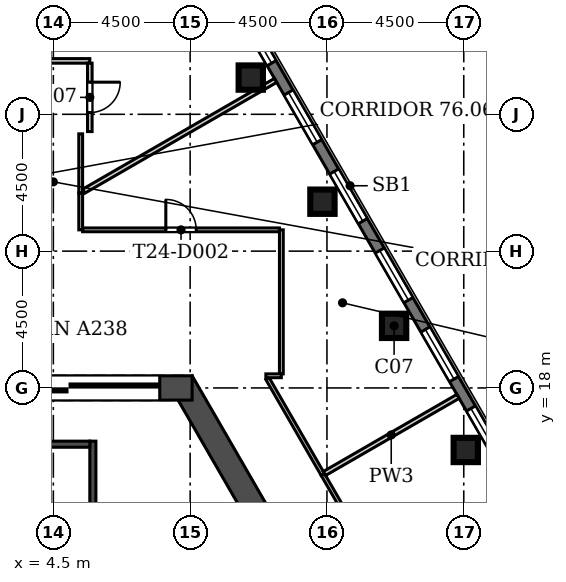
"""IFC4 building model, lengths in metres.
Left out: names, types, materials, properties, quantities, classifications, styles, units other than length and angle.
Written with IfcOpenShell. Run it as: python <this file> out.ifc"""

import sys

from ifc_helpers import new_model, si_unit, direction, frame, frame_2d, origin, origin_2d, place, context, subcontext, project, spatial, rectangle, extrude, element, fill, save


model = new_model("IFC4")
c1 = context("Model", 3, precision=1e-05, world=origin(), true_north=direction((0.0, 1.0)))
c2 = subcontext(c1, "Body", "Model", "MODEL_VIEW")
j1 = project(units=[si_unit("LENGTHUNIT", "METRE"), si_unit("PLANEANGLEUNIT", "RADIAN")], contexts=[c1])
p1 = place(None, origin())
s1 = spatial("IfcSite", under=j1, at=p1, CompositionType="ELEMENT")
p2 = place(p1, origin())
s2 = spatial("IfcBuilding", under=s1, at=p2, CompositionType="ELEMENT")
p3 = place(p2, frame((0.0, 0.0, 335.1)))
s3 = spatial("IfcBuildingStorey", under=s2, at=p3, CompositionType="ELEMENT", Elevation=335.1)
for number, where, z_axis, x_axis in (
    (1, (18.066, 15.96, 0.0), (0.0, 0.0, 1.0), (1.0, 0.0, 0.0)),
    (2, (15.709, 20.042, 0.0), (0.0, 0.0, 1.0), (1.0, 0.0, 0.0)),
    (3, (13.352, 24.125, 0.0), (0.0, 0.0, 1.0), (1.0, 0.0, 0.0)),
    (4, (10.994, 28.208, 0.0), (0.0, 0.0, 1.0), (1.0, 0.0, 0.0)),
):
    element("IfcColumn", number, at=place(p3, frame(where, z_axis=z_axis, x_axis=x_axis)), inside=s3, PredefinedType="COLUMN", context=c2, shape_type="SweptSolid", body=[
        extrude(rectangle(XDim=0.8, YDim=0.8, at=origin_2d()), origin(), (0.0, 0.0, 1.0), 4.2),
    ])
p4 = place(p3, frame((13.054, 10.692, 0.0), z_axis=(0.0, 0.0, 1.0), x_axis=(-0.500015780397, 0.866016292776, 0.0)))
e5 = element("IfcWall", 5, at=p4, inside=s3, PredefinedType="SHEAR", context=c2, shape_type="SweptSolid", body=[
    extrude(rectangle(XDim=8.67, YDim=0.8, at=frame_2d((4.335, 0.0))), origin(), (0.0, 0.0, 1.0), 4.2),
])
p5 = place(p3, frame((9.065, 18.0, 0.0), z_axis=(0.0, 0.0, 1.0), x_axis=(-1.0, 0.0, 0.0)))
e6 = element("IfcWall", 6, at=p5, inside=s3, PredefinedType="SHEAR", context=c2, shape_type="SweptSolid", body=[
    extrude(rectangle(XDim=18.13, YDim=0.8, at=frame_2d((9.065, 0.0))), origin(), (0.0, 0.0, 1.0), 4.2),
])
p6 = place(p5, frame((8.365, 0.0, 0.0)))
e7 = element("IfcOpeningElement", 7, at=p6, cuts=e6, PredefinedType="OPENING", context=c2, shape_type="SweptSolid", body=[
    extrude(rectangle(XDim=1.4, YDim=2.1, at=frame_2d((0.7, 1.05))), frame((0.0, 0.41, 0.0), z_axis=(0.0, -1.0, 0.0), x_axis=(1.0, 0.0, 0.0)), (0.0, 0.0, 1.0), 0.82),
])
p7 = place(p5, frame((11.065, 0.0, 0.0)))
e8 = element("IfcOpeningElement", 8, at=p7, cuts=e6, PredefinedType="OPENING", context=c2, shape_type="SweptSolid", body=[
    extrude(rectangle(XDim=6.0, YDim=2.4, at=frame_2d((3.0, 1.2))), frame((0.0, 0.41, 0.0), z_axis=(0.0, -1.0, 0.0), x_axis=(1.0, 0.0, 0.0)), (0.0, 0.0, 1.0), 0.82),
])
p8 = place(p5, frame((1.065, 0.0, 0.0)))
e9 = element("IfcOpeningElement", 9, at=p8, cuts=e6, PredefinedType="OPENING", context=c2, shape_type="SweptSolid", body=[
    extrude(rectangle(XDim=6.0, YDim=2.4, at=frame_2d((3.0, 1.2))), frame((0.0, 0.41, 0.0), z_axis=(0.0, -1.0, 0.0), x_axis=(1.0, 0.0, 0.0)), (0.0, 0.0, 1.0), 0.82),
])
p9 = place(p3, frame((23.788, 7.709, 0.0), z_axis=(0.0, 0.0, 1.0), x_axis=(-0.500001731347, 0.866024404189, 0.0)))
e10 = element("IfcWall", 10, at=p9, inside=s3, PredefinedType="SOLIDWALL", context=c2, shape_type="SweptSolid", body=[
    extrude(rectangle(XDim=38.87, YDim=0.34, at=frame_2d((19.435, 0.0))), origin(), (0.0, 0.0, 1.0), 3.8),
])
p10 = place(p9, frame((3.218, 0.0, 0.9)))
e11 = element("IfcOpeningElement", 11, at=p10, cuts=e10, PredefinedType="OPENING", context=c2, shape_type="SweptSolid", body=[
    extrude(rectangle(XDim=1.885, YDim=2.6, at=frame_2d((0.942, 1.3))), frame((0.0, 0.18, 0.0), z_axis=(0.0, -1.0, 0.0), x_axis=(1.0, 0.0, 0.0)), (0.0, 0.0, 1.0), 0.36),
])
p11 = place(p9, frame((6.218, 0.0, 0.9)))
e12 = element("IfcOpeningElement", 12, at=p11, cuts=e10, PredefinedType="OPENING", context=c2, shape_type="SweptSolid", body=[
    extrude(rectangle(XDim=1.885, YDim=2.6, at=frame_2d((0.942, 1.3))), frame((0.0, 0.18, 0.0), z_axis=(0.0, -1.0, 0.0), x_axis=(1.0, 0.0, 0.0)), (0.0, 0.0, 1.0), 0.36),
])
p12 = place(p9, frame((9.218, 0.0, 0.9)))
e13 = element("IfcOpeningElement", 13, at=p12, cuts=e10, PredefinedType="OPENING", context=c2, shape_type="SweptSolid", body=[
    extrude(rectangle(XDim=1.885, YDim=2.6, at=frame_2d((0.942, 1.3))), frame((0.0, 0.18, 0.0), z_axis=(0.0, -1.0, 0.0), x_axis=(1.0, 0.0, 0.0)), (0.0, 0.0, 1.0), 0.36),
])
p13 = place(p9, frame((12.218, 0.0, 0.9)))
e14 = element("IfcOpeningElement", 14, at=p13, cuts=e10, PredefinedType="OPENING", context=c2, shape_type="SweptSolid", body=[
    extrude(rectangle(XDim=1.885, YDim=2.6, at=frame_2d((0.942, 1.3))), frame((0.0, 0.18, 0.0), z_axis=(0.0, -1.0, 0.0), x_axis=(1.0, 0.0, 0.0)), (0.0, 0.0, 1.0), 0.36),
])
p14 = place(p9, frame((15.218, 0.0, 0.9)))
e15 = element("IfcOpeningElement", 15, at=p14, cuts=e10, PredefinedType="OPENING", context=c2, shape_type="SweptSolid", body=[
    extrude(rectangle(XDim=1.885, YDim=2.6, at=frame_2d((0.942, 1.3))), frame((0.0, 0.18, 0.0), z_axis=(0.0, -1.0, 0.0), x_axis=(1.0, 0.0, 0.0)), (0.0, 0.0, 1.0), 0.36),
])
p15 = place(p9, frame((18.218, 0.0, 0.9)))
e16 = element("IfcOpeningElement", 16, at=p15, cuts=e10, PredefinedType="OPENING", context=c2, shape_type="SweptSolid", body=[
    extrude(rectangle(XDim=1.885, YDim=2.6, at=frame_2d((0.942, 1.3))), frame((0.0, 0.18, 0.0), z_axis=(0.0, -1.0, 0.0), x_axis=(1.0, 0.0, 0.0)), (0.0, 0.0, 1.0), 0.36),
])
p16 = place(p9, frame((21.218, 0.0, 0.9)))
e17 = element("IfcOpeningElement", 17, at=p16, cuts=e10, PredefinedType="OPENING", context=c2, shape_type="SweptSolid", body=[
    extrude(rectangle(XDim=1.885, YDim=2.6, at=frame_2d((0.942, 1.3))), frame((0.0, 0.18, 0.0), z_axis=(0.0, -1.0, 0.0), x_axis=(1.0, 0.0, 0.0)), (0.0, 0.0, 1.0), 0.36),
])
p17 = place(p9, frame((24.218, 0.0, 0.9)))
e18 = element("IfcOpeningElement", 18, at=p17, cuts=e10, PredefinedType="OPENING", context=c2, shape_type="SweptSolid", body=[
    extrude(rectangle(XDim=1.885, YDim=2.6, at=frame_2d((0.942, 1.3))), frame((0.0, 0.18, 0.0), z_axis=(0.0, -1.0, 0.0), x_axis=(1.0, 0.0, 0.0)), (0.0, 0.0, 1.0), 0.36),
])
p18 = place(p9, frame((27.218, 0.0, 0.9)))
e19 = element("IfcOpeningElement", 19, at=p18, cuts=e10, PredefinedType="OPENING", context=c2, shape_type="SweptSolid", body=[
    extrude(rectangle(XDim=1.885, YDim=2.6, at=frame_2d((0.942, 1.3))), frame((0.0, 0.18, 0.0), z_axis=(0.0, -1.0, 0.0), x_axis=(1.0, 0.0, 0.0)), (0.0, 0.0, 1.0), 0.36),
])
p19 = place(p9, frame((30.218, 0.0, 0.9)))
e20 = element("IfcOpeningElement", 20, at=p19, cuts=e10, PredefinedType="OPENING", context=c2, shape_type="SweptSolid", body=[
    extrude(rectangle(XDim=1.885, YDim=2.6, at=frame_2d((0.942, 1.3))), frame((0.0, 0.18, 0.0), z_axis=(0.0, -1.0, 0.0), x_axis=(1.0, 0.0, 0.0)), (0.0, 0.0, 1.0), 0.36),
])
p20 = place(p9, frame((33.218, 0.0, 0.9)))
e21 = element("IfcOpeningElement", 21, at=p20, cuts=e10, PredefinedType="OPENING", context=c2, shape_type="SweptSolid", body=[
    extrude(rectangle(XDim=1.885, YDim=2.6, at=frame_2d((0.942, 1.3))), frame((0.0, 0.18, 0.0), z_axis=(0.0, -1.0, 0.0), x_axis=(1.0, 0.0, 0.0)), (0.0, 0.0, 1.0), 0.36),
])
p21 = place(p9, frame((1.051, 0.0, 0.9)))
e22 = element("IfcOpeningElement", 22, at=p21, cuts=e10, PredefinedType="OPENING", context=c2, shape_type="SweptSolid", body=[
    extrude(rectangle(XDim=1.115, YDim=2.4, at=frame_2d((0.558, 1.2))), frame((0.0, 0.18, 0.0), z_axis=(0.0, -1.0, 0.0), x_axis=(1.0, 0.0, 0.0)), (0.0, 0.0, 1.0), 0.36),
])
p22 = place(p9, frame((36.429, 0.0, 0.9)))
e23 = element("IfcOpeningElement", 23, at=p22, cuts=e10, PredefinedType="OPENING", context=c2, shape_type="SweptSolid", body=[
    extrude(rectangle(XDim=1.115, YDim=2.4, at=frame_2d((0.558, 1.2))), frame((0.0, 0.18, 0.0), z_axis=(0.0, -1.0, 0.0), x_axis=(1.0, 0.0, 0.0)), (0.0, 0.0, 1.0), 0.36),
])
p23 = place(p3, frame((5.8, 8.25, -0.4), z_axis=(0.0, 0.0, 1.0), x_axis=(0.0, 1.0, 0.0)))
e24 = element("IfcWall", 24, at=p23, inside=s3, PredefinedType="SOLIDWALL", context=c2, shape_type="SweptSolid", body=[
    extrude(rectangle(XDim=8.0, YDim=0.2, at=frame_2d((4.0, 0.0))), origin(), (0.0, 0.0, 1.0), 4.2),
])
p24 = place(p23, frame((3.5, 0.0, 0.4)))
e25 = element("IfcOpeningElement", 25, at=p24, cuts=e24, PredefinedType="OPENING", context=c2, shape_type="SweptSolid", body=[
    extrude(rectangle(XDim=1.0, YDim=2.1, at=frame_2d((0.5, 1.05))), frame((0.0, 0.11, 0.0), z_axis=(0.0, -1.0, 0.0), x_axis=(1.0, 0.0, 0.0)), (0.0, 0.0, 1.0), 0.22),
])
p25 = place(p3, frame((3.7, 16.15, -0.4), z_axis=(0.0, 0.0, 1.0), x_axis=(1.0, 0.0, 0.0)))
e26 = element("IfcWall", 26, at=p25, inside=s3, PredefinedType="SOLIDWALL", context=c2, shape_type="SweptSolid", body=[
    extrude(rectangle(XDim=2.0, YDim=0.2, at=frame_2d((1.0, 0.0))), origin(), (0.0, 0.0, 1.0), 4.2),
])
p26 = place(p3, frame((11.544, 18.306, 0.0), z_axis=(0.0, 0.0, 1.0), x_axis=(0.500007048974, -0.866021334019, 0.0)))
e27 = element("IfcWall", 27, at=p26, inside=s3, PredefinedType="PARTITIONING", context=c2, shape_type="SweptSolid", body=[
    extrude(rectangle(XDim=3.639, YDim=0.125, at=frame_2d((1.819, 0.0))), origin(), (0.0, 0.0, 1.0), 3.8),
])
p27 = place(p3, frame((13.364, 15.155, 0.0), z_axis=(0.0, 0.0, 1.0), x_axis=(0.499974900732, -0.866039894369, 0.0)))
e28 = element("IfcWall", 28, at=p27, inside=s3, PredefinedType="PARTITIONING", context=c2, shape_type="SweptSolid", body=[
    extrude(rectangle(XDim=4.381, YDim=0.125, at=frame_2d((2.19, 0.0))), origin(), (0.0, 0.0, 1.0), 3.8),
])
p28 = place(p3, frame((5.462, 23.2, 0.0), z_axis=(0.0, 0.0, 1.0), x_axis=(1.0, 0.0, 0.0)))
e29 = element("IfcWall", 29, at=p28, inside=s3, PredefinedType="PARTITIONING", context=c2, shape_type="SweptSolid", body=[
    extrude(rectangle(XDim=6.475, YDim=0.125, at=frame_2d((3.238, 0.0))), origin(), (0.0, 0.0, 1.0), 3.8),
])
p29 = place(p28, frame((2.738, 0.0, 0.0)))
e30 = element("IfcOpeningElement", 30, at=p29, cuts=e29, PredefinedType="OPENING", context=c2, shape_type="SweptSolid", body=[
    extrude(rectangle(XDim=1.0, YDim=2.1, at=frame_2d((0.5, 1.05))), frame((0.0, 0.073, 0.0), z_axis=(0.0, -1.0, 0.0), x_axis=(1.0, 0.0, 0.0)), (0.0, 0.0, 1.0), 0.145),
])
p30 = place(p3, frame((12.0, 23.2, 0.0), z_axis=(0.0, 0.0, 1.0), x_axis=(0.0, -1.0, 0.0)))
e31 = element("IfcWall", 31, at=p30, inside=s3, PredefinedType="PARTITIONING", context=c2, shape_type="SweptSolid", body=[
    extrude(rectangle(XDim=4.738, YDim=0.125, at=frame_2d((2.369, 0.0))), origin(), (0.0, 0.0, 1.0), 3.8),
])
p31 = place(p3, frame((12.0, 18.4, 0.0), z_axis=(0.0, 0.0, 1.0), x_axis=(-1.0, 0.0, 0.0)))
e32 = element("IfcWall", 32, at=p31, inside=s3, PredefinedType="PARTITIONING", context=c2, shape_type="SweptSolid", body=[
    extrude(rectangle(XDim=0.51, YDim=0.125, at=frame_2d((0.255, 0.0))), origin(), (0.0, 0.0, 1.0), 3.8),
])
p32 = place(p3, frame((4.15, 28.757, 0.0), z_axis=(0.0, 0.0, 1.0), x_axis=(1.0, 0.0, 0.0)))
e33 = element("IfcWall", 33, at=p32, inside=s3, PredefinedType="PARTITIONING", context=c2, shape_type="SweptSolid", body=[
    extrude(rectangle(XDim=1.55, YDim=0.15, at=frame_2d((0.775, 0.0))), origin(), (0.0, 0.0, 1.0), 3.8),
])
p33 = place(p3, frame((5.7, 28.682, 0.0), z_axis=(0.0, 0.0, 1.0), x_axis=(0.0, -1.0, 0.0)))
e34 = element("IfcWall", 34, at=p33, inside=s3, PredefinedType="PARTITIONING", context=c2, shape_type="SweptSolid", body=[
    extrude(rectangle(XDim=2.25, YDim=0.15, at=frame_2d((1.125, 0.0))), origin(), (0.0, 0.0, 1.0), 3.8),
])
p34 = place(p33, frame((0.625, 0.0, 0.0)))
e35 = element("IfcOpeningElement", 35, at=p34, cuts=e34, PredefinedType="OPENING", context=c2, shape_type="SweptSolid", body=[
    extrude(rectangle(XDim=1.0, YDim=2.1, at=frame_2d((0.5, 1.05))), frame((0.0, 0.085, 0.0), z_axis=(0.0, -1.0, 0.0), x_axis=(1.0, 0.0, 0.0)), (0.0, 0.0, 1.0), 0.17),
])
p35 = place(p3, frame((5.4, 24.413, 0.0), z_axis=(0.0, 0.0, 1.0), x_axis=(0.0, -1.0, 0.0)))
e36 = element("IfcWall", 36, at=p35, inside=s3, PredefinedType="PARTITIONING", context=c2, shape_type="SweptSolid", body=[
    extrude(rectangle(XDim=1.213, YDim=0.125, at=frame_2d((0.607, 0.0))), origin(), (0.0, 0.0, 1.0), 3.8),
])
p36 = place(p3, frame((5.4, 26.357, 0.0), z_axis=(0.0, 0.0, 1.0), x_axis=(0.0, -1.0, 0.0)))
e37 = element("IfcWall", 37, at=p36, inside=s3, PredefinedType="PARTITIONING", context=c2, shape_type="SweptSolid", body=[
    extrude(rectangle(XDim=1.944, YDim=0.125, at=frame_2d((0.972, 0.0))), origin(), (0.0, 0.0, 1.0), 3.8),
])
p37 = place(p3, frame((5.5, 24.471, 0.0), z_axis=(0.0, 0.0, 1.0), x_axis=(0.866028417731, 0.499994779655, 0.0)))
e38 = element("IfcWall", 38, at=p37, inside=s3, PredefinedType="PARTITIONING", context=c2, shape_type="SweptSolid", body=[
    extrude(rectangle(XDim=6.674, YDim=0.15, at=frame_2d((3.337, 0.0))), origin(), (0.0, 0.0, 1.0), 3.8),
])
p38 = place(p3, frame((11.394, 27.874, 0.0), z_axis=(0.0, 0.0, 1.0), x_axis=(0.865889515344, 0.500235291855, 0.0)))
e39 = element("IfcWall", 39, at=p38, inside=s3, PredefinedType="PARTITIONING", context=c2, shape_type="SweptSolid", body=[
    extrude(rectangle(XDim=0.481, YDim=0.15, at=frame_2d((0.24, 0.0))), origin(), (0.0, 0.0, 1.0), 3.8),
])
p39 = place(p3, frame((17.811, 17.722, 0.0), z_axis=(0.0, 0.0, 1.0), x_axis=(-0.86601005171, -0.50002658963, 0.0)))
e40 = element("IfcWall", 40, at=p39, inside=s3, PredefinedType="PARTITIONING", context=c2, shape_type="SweptSolid", body=[
    extrude(rectangle(XDim=5.073, YDim=0.15, at=frame_2d((2.536, 0.0))), origin(), (0.0, 0.0, 1.0), 3.8),
])
p40 = place(p12, origin())
e41 = element("IfcWindow", 41, at=p40, inside=s3, PartitioningType="SINGLE_PANEL", PredefinedType="WINDOW", context=c2, shape_type="SweptSolid", body=[
    extrude(rectangle(XDim=1.885, YDim=2.6, at=frame_2d((0.942, 1.3))), frame((0.0, 0.11, 0.0), z_axis=(0.0, -1.0, 0.0), x_axis=(1.0, 0.0, 0.0)), (0.0, 0.0, 1.0), 0.06),
])
fill(e13, e41)
p41 = place(p13, origin())
e42 = element("IfcWindow", 42, at=p41, inside=s3, PartitioningType="SINGLE_PANEL", PredefinedType="WINDOW", context=c2, shape_type="SweptSolid", body=[
    extrude(rectangle(XDim=1.885, YDim=2.6, at=frame_2d((0.942, 1.3))), frame((0.0, 0.11, 0.0), z_axis=(0.0, -1.0, 0.0), x_axis=(1.0, 0.0, 0.0)), (0.0, 0.0, 1.0), 0.06),
])
fill(e14, e42)
p42 = place(p14, origin())
e43 = element("IfcWindow", 43, at=p42, inside=s3, PartitioningType="SINGLE_PANEL", PredefinedType="WINDOW", context=c2, shape_type="SweptSolid", body=[
    extrude(rectangle(XDim=1.885, YDim=2.6, at=frame_2d((0.942, 1.3))), frame((0.0, 0.11, 0.0), z_axis=(0.0, -1.0, 0.0), x_axis=(1.0, 0.0, 0.0)), (0.0, 0.0, 1.0), 0.06),
])
fill(e15, e43)
p43 = place(p15, origin())
e44 = element("IfcWindow", 44, at=p43, inside=s3, PartitioningType="SINGLE_PANEL", PredefinedType="WINDOW", context=c2, shape_type="SweptSolid", body=[
    extrude(rectangle(XDim=1.885, YDim=2.6, at=frame_2d((0.942, 1.3))), frame((0.0, 0.11, 0.0), z_axis=(0.0, -1.0, 0.0), x_axis=(1.0, 0.0, 0.0)), (0.0, 0.0, 1.0), 0.06),
])
fill(e16, e44)
p44 = place(p16, origin())
e45 = element("IfcWindow", 45, at=p44, inside=s3, PartitioningType="SINGLE_PANEL", PredefinedType="WINDOW", context=c2, shape_type="SweptSolid", body=[
    extrude(rectangle(XDim=1.885, YDim=2.6, at=frame_2d((0.942, 1.3))), frame((0.0, 0.11, 0.0), z_axis=(0.0, -1.0, 0.0), x_axis=(1.0, 0.0, 0.0)), (0.0, 0.0, 1.0), 0.06),
])
fill(e17, e45)
p45 = place(p17, origin())
e46 = element("IfcWindow", 46, at=p45, inside=s3, PartitioningType="SINGLE_PANEL", PredefinedType="WINDOW", context=c2, shape_type="SweptSolid", body=[
    extrude(rectangle(XDim=1.885, YDim=2.6, at=frame_2d((0.942, 1.3))), frame((0.0, 0.11, 0.0), z_axis=(0.0, -1.0, 0.0), x_axis=(1.0, 0.0, 0.0)), (0.0, 0.0, 1.0), 0.06),
])
fill(e18, e46)
p46 = place(p8, origin())
e47 = element("IfcDoor", 47, at=p46, inside=s3, OperationType="DOUBLE_DOOR_SLIDING", PredefinedType="DOOR", context=c2, shape_type="SweptSolid", body=[
    extrude(rectangle(XDim=6.0, YDim=2.4, at=frame_2d((3.0, 1.2))), frame((0.0, 0.025, 0.0), z_axis=(0.0, -1.0, 0.0), x_axis=(1.0, 0.0, 0.0)), (0.0, 0.0, 1.0), 0.05),
])
fill(e9, e47)
p47 = place(p29, origin())
e48 = element("IfcDoor", 48, at=p47, inside=s3, OperationType="SINGLE_SWING_LEFT", PredefinedType="DOOR", context=c2, shape_type="SweptSolid", body=[
    extrude(rectangle(XDim=1.0, YDim=2.1, at=frame_2d((0.5, 1.05))), frame((0.0, 0.025, 0.0), z_axis=(0.0, -1.0, 0.0), x_axis=(1.0, 0.0, 0.0)), (0.0, 0.0, 1.0), 0.05),
])
fill(e30, e48)
p48 = place(p34, origin())
e49 = element("IfcDoor", 49, at=p48, inside=s3, OperationType="SINGLE_SWING_LEFT", PredefinedType="DOOR", context=c2, shape_type="SweptSolid", body=[
    extrude(rectangle(XDim=1.0, YDim=2.1, at=frame_2d((0.5, 1.05))), frame((0.0, 0.025, 0.0), z_axis=(0.0, -1.0, 0.0), x_axis=(1.0, 0.0, 0.0)), (0.0, 0.0, 1.0), 0.05),
])
fill(e35, e49)
save(model, sys.argv[1])
